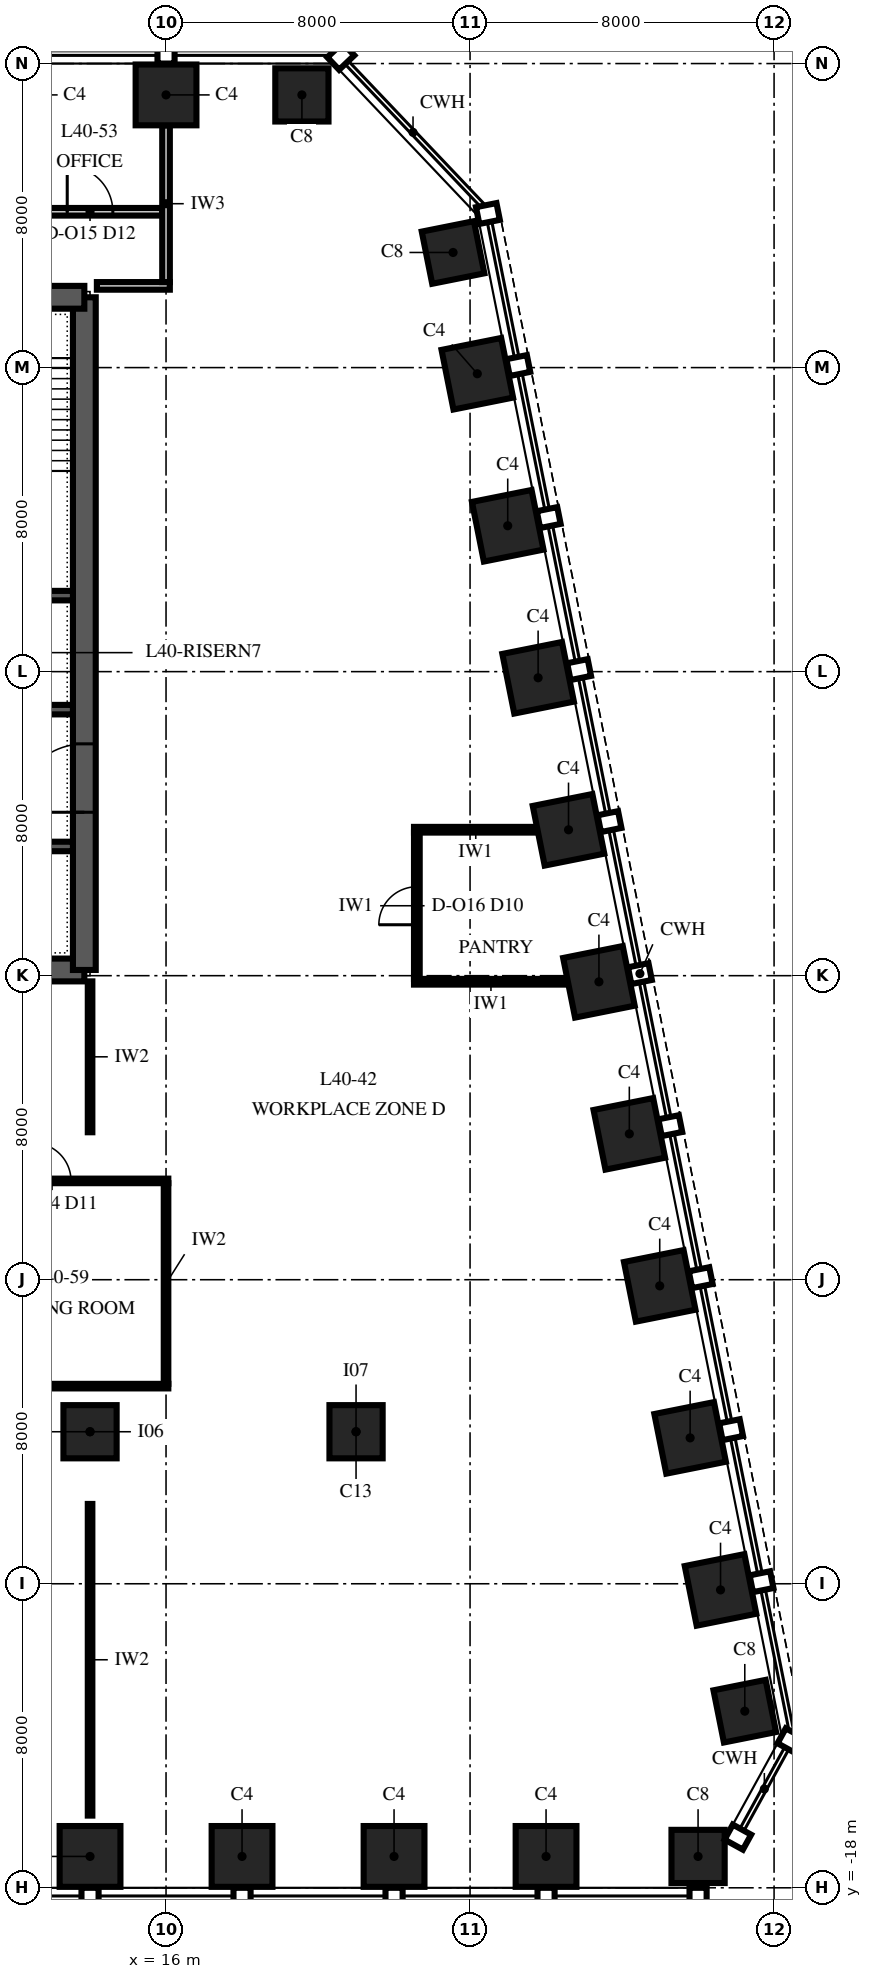
"""IFC4 building model, lengths in metres.
Left out: names, types, materials, properties, quantities, classifications, styles, units other than length and angle.
Written with IfcOpenShell. Run it as: python <this file> out.ifc"""

import sys

from ifc_helpers import new_model, si_unit, direction, frame, frame_2d, origin, origin_2d, place, context, subcontext, project, spatial, polyline, rectangle, outline, extrude, element, fill, save


model = new_model("IFC4")
c1 = context("Model", 3, precision=1e-05, world=origin(), true_north=direction((0.0, 1.0)))
c2 = subcontext(c1, "Body", "Model", "MODEL_VIEW")
j1 = project(units=[si_unit("LENGTHUNIT", "METRE"), si_unit("PLANEANGLEUNIT", "RADIAN")], contexts=[c1])
p1 = place(None, origin())
s1 = spatial("IfcSite", under=j1, at=p1, CompositionType="ELEMENT")
p2 = place(p1, origin())
s2 = spatial("IfcBuilding", under=s1, at=p2, CompositionType="ELEMENT")
p3 = place(p2, frame((0.0, 0.0, 178.0)))
s3 = spatial("IfcBuildingStorey", under=s2, at=p3, CompositionType="ELEMENT", Elevation=178.0)
for number, where, z_axis, x_axis in (
    (1, (14.0, -17.175, 0.0), (0.0, 0.0, 1.0), (1.0, 0.0, 0.0)),
    (2, (18.0, -17.175, 0.0), (0.0, 0.0, 1.0), (1.0, 0.0, 0.0)),
    (3, (22.0, -17.175, 0.0), (0.0, 0.0, 1.0), (1.0, 0.0, 0.0)),
    (4, (26.0, -17.175, 0.0), (0.0, 0.0, 1.0), (1.0, 0.0, 0.0)),
):
    element("IfcColumn", number, at=place(p3, frame(where, z_axis=z_axis, x_axis=x_axis)), inside=s3, PredefinedType="COLUMN", context=c2, shape_type="SweptSolid", body=[
        extrude(rectangle(XDim=1.6, YDim=1.6, at=origin_2d()), origin(), (0.0, 0.0, 1.0), 4.0),
    ])
for number, where, z_axis, x_axis in (
    (5, (30.0, -17.175, 0.0), (0.0, 0.0, 1.0), (1.0, 0.0, 0.0)),
    (6, (31.229, -13.353, 0.0), (0.0, 0.0, 1.0), (-0.196, 0.981, 0.0)),
):
    element("IfcColumn", number, at=place(p3, frame(where, z_axis=z_axis, x_axis=x_axis)), inside=s3, PredefinedType="COLUMN", context=c2, shape_type="SweptSolid", body=[
        extrude(rectangle(XDim=1.4, YDim=1.4, at=origin_2d()), origin(), (0.0, 0.0, 1.0), 4.0),
    ])
for number, where, z_axis, x_axis in (
    (7, (30.591, -10.162, 0.0), (0.0, 0.0, 1.0), (-0.196, 0.981, 0.0)),
    (8, (29.791, -6.162, 0.0), (0.0, 0.0, 1.0), (-0.196, 0.981, 0.0)),
    (9, (28.991, -2.162, 0.0), (0.0, 0.0, 1.0), (-0.196, 0.981, 0.0)),
    (10, (28.191, 1.838, 0.0), (0.0, 0.0, 1.0), (-0.196, 0.981, 0.0)),
    (11, (27.391, 5.838, 0.0), (0.0, 0.0, 1.0), (-0.196, 0.981, 0.0)),
    (12, (26.591, 9.838, 0.0), (0.0, 0.0, 1.0), (-0.196, 0.981, 0.0)),
    (13, (25.791, 13.838, 0.0), (0.0, 0.0, 1.0), (-0.196, 0.981, 0.0)),
    (14, (24.991, 17.838, 0.0), (0.0, 0.0, 1.0), (-0.196, 0.981, 0.0)),
    (15, (24.191, 21.838, 0.0), (0.0, 0.0, 1.0), (-0.196, 0.981, 0.0)),
):
    element("IfcColumn", number, at=place(p3, frame(where, z_axis=z_axis, x_axis=x_axis)), inside=s3, PredefinedType="COLUMN", context=c2, shape_type="SweptSolid", body=[
        extrude(rectangle(XDim=1.6, YDim=1.6, at=origin_2d()), origin(), (0.0, 0.0, 1.0), 4.0),
    ])
for number, where, z_axis, x_axis in (
    (16, (23.553, 25.029, 0.0), (0.0, 0.0, 1.0), (-0.196, 0.981, 0.0)),
    (17, (19.575, 29.175, 0.0), (0.0, 0.0, 1.0), (-1.0, 0.0, 0.0)),
):
    element("IfcColumn", number, at=place(p3, frame(where, z_axis=z_axis, x_axis=x_axis)), inside=s3, PredefinedType="COLUMN", context=c2, shape_type="SweptSolid", body=[
        extrude(rectangle(XDim=1.4, YDim=1.4, at=origin_2d()), origin(), (0.0, 0.0, 1.0), 4.0),
    ])
p4 = place(p3, frame((16.0, 29.175, 0.0), z_axis=(0.0, 0.0, 1.0), x_axis=(-1.0, 0.0, 0.0)))
e18 = element("IfcColumn", 18, at=p4, inside=s3, PredefinedType="COLUMN", context=c2, shape_type="SweptSolid", body=[
    extrude(rectangle(XDim=1.6, YDim=1.6, at=origin_2d()), origin(), (0.0, 0.0, 1.0), 4.0),
])
for number, where, z_axis, x_axis in (
    (19, (14.0, -6.0, 0.0), (0.0, 0.0, 1.0), (1.0, 0.0, 0.0)),
    (20, (21.0, -6.0, 0.0), (0.0, 0.0, 1.0), (1.0, 0.0, 0.0)),
):
    element("IfcColumn", number, at=place(p3, frame(where, z_axis=z_axis, x_axis=x_axis)), inside=s3, PredefinedType="COLUMN", context=c2, shape_type="SweptSolid", body=[
        extrude(rectangle(XDim=1.4, YDim=1.4, at=origin_2d()), origin(), (0.0, 0.0, 1.0), 4.0),
    ])
p5 = place(p3, frame((-13.85, 6.15, 0.0), z_axis=(0.0, 0.0, 1.0), x_axis=(1.0, 0.0, 0.0)))
e21 = element("IfcWall", 21, at=p5, inside=s3, PredefinedType="SHEAR", context=c2, shape_type="SweptSolid", body=[
    extrude(rectangle(XDim=27.7, YDim=0.6, at=frame_2d((13.85, 0.0))), origin(), (0.0, 0.0, 1.0), 4.0),
])
p6 = place(p3, frame((13.85, 6.15, 0.0), z_axis=(0.0, 0.0, 1.0), x_axis=(0.0, 1.0, 0.0)))
e22 = element("IfcWall", 22, at=p6, inside=s3, PredefinedType="SHEAR", context=c2, shape_type="SweptSolid", body=[
    extrude(outline(polyline([(0.0, -0.3), (17.7, -0.3), (17.7, 0.0), (17.4, 0.0), (17.4, 0.3), (0.3, 0.3), (0.3, 0.0), (0.0, 0.0), (0.0, -0.3)])), origin(), (0.0, 0.0, 1.0), 4.0),
])
p7 = place(p6, frame((4.15, 0.0, 0.0)))
e23 = element("IfcOpeningElement", 23, at=p7, cuts=e22, PredefinedType="OPENING", context=c2, shape_type="SweptSolid", body=[
    extrude(rectangle(XDim=1.8, YDim=2.4, at=frame_2d((0.9, 1.2))), frame((0.0, 0.315, 0.0), z_axis=(0.0, -1.0, 0.0), x_axis=(1.0, 0.0, 0.0)), (0.0, 0.0, 1.0), 0.63),
])
p8 = place(p3, frame((13.85, 23.85, 0.0), z_axis=(0.0, 0.0, 1.0), x_axis=(-1.0, 0.0, 0.0)))
e24 = element("IfcWall", 24, at=p8, inside=s3, PredefinedType="SHEAR", context=c2, shape_type="SweptSolid", body=[
    extrude(rectangle(XDim=27.7, YDim=0.6, at=frame_2d((13.85, 0.0))), origin(), (0.0, 0.0, 1.0), 4.0),
])
p9 = place(p8, frame((21.75, 0.0, 0.0)))
e25 = element("IfcOpeningElement", 25, at=p9, cuts=e24, PredefinedType="OPENING", context=c2, shape_type="SweptSolid", body=[
    extrude(rectangle(XDim=1.0, YDim=2.1, at=frame_2d((0.5, 1.05))), frame((0.0, 0.315, 0.0), z_axis=(0.0, -1.0, 0.0), x_axis=(1.0, 0.0, 0.0)), (0.0, 0.0, 1.0), 0.63),
])
p10 = place(p8, frame((4.95, 0.0, 0.0)))
e26 = element("IfcOpeningElement", 26, at=p10, cuts=e24, PredefinedType="OPENING", context=c2, shape_type="SweptSolid", body=[
    extrude(rectangle(XDim=1.0, YDim=2.1, at=frame_2d((0.5, 1.05))), frame((0.0, 0.315, 0.0), z_axis=(0.0, -1.0, 0.0), x_axis=(1.0, 0.0, 0.0)), (0.0, 0.0, 1.0), 0.63),
])
p11 = place(p8, frame((17.35, 0.0, 0.0)))
e27 = element("IfcOpeningElement", 27, at=p11, cuts=e24, PredefinedType="OPENING", context=c2, shape_type="SweptSolid", body=[
    extrude(rectangle(XDim=1.0, YDim=2.1, at=frame_2d((0.5, 1.05))), frame((0.0, 0.315, 0.0), z_axis=(0.0, -1.0, 0.0), x_axis=(1.0, 0.0, 0.0)), (0.0, 0.0, 1.0), 0.63),
])
p12 = place(p8, frame((13.35, 0.0, 0.0)))
e28 = element("IfcOpeningElement", 28, at=p12, cuts=e24, PredefinedType="OPENING", context=c2, shape_type="SweptSolid", body=[
    extrude(rectangle(XDim=1.0, YDim=2.1, at=frame_2d((0.5, 1.05))), frame((0.0, 0.315, 0.0), z_axis=(0.0, -1.0, 0.0), x_axis=(1.0, 0.0, 0.0)), (0.0, 0.0, 1.0), 0.63),
])
p13 = place(p8, frame((9.35, 0.0, 0.0)))
e29 = element("IfcOpeningElement", 29, at=p13, cuts=e24, PredefinedType="OPENING", context=c2, shape_type="SweptSolid", body=[
    extrude(rectangle(XDim=1.0, YDim=2.1, at=frame_2d((0.5, 1.05))), frame((0.0, 0.315, 0.0), z_axis=(0.0, -1.0, 0.0), x_axis=(1.0, 0.0, 0.0)), (0.0, 0.0, 1.0), 0.63),
])
p14 = place(p3, frame((-13.55, 9.4, 0.0), z_axis=(0.0, 0.0, 1.0), x_axis=(1.0, 0.0, 0.0)))
e30 = element("IfcWall", 30, at=p14, inside=s3, PredefinedType="SHEAR", context=c2, shape_type="SweptSolid", body=[
    extrude(rectangle(XDim=27.1, YDim=0.25, at=frame_2d((13.55, 0.0))), origin(), (0.0, 0.0, 1.0), 4.0),
])
p15 = place(p14, frame((0.4, 0.0, 0.0)))
e31 = element("IfcOpeningElement", 31, at=p15, cuts=e30, PredefinedType="OPENING", context=c2, shape_type="SweptSolid", body=[
    extrude(rectangle(XDim=1.1, YDim=2.1, at=frame_2d((0.55, 1.05))), frame((0.0, 0.14, 0.0), z_axis=(0.0, -1.0, 0.0), x_axis=(1.0, 0.0, 0.0)), (0.0, 0.0, 1.0), 0.28),
])
p16 = place(p14, frame((3.2, 0.0, 0.0)))
e32 = element("IfcOpeningElement", 32, at=p16, cuts=e30, PredefinedType="OPENING", context=c2, shape_type="SweptSolid", body=[
    extrude(rectangle(XDim=1.1, YDim=2.1, at=frame_2d((0.55, 1.05))), frame((0.0, 0.14, 0.0), z_axis=(0.0, -1.0, 0.0), x_axis=(1.0, 0.0, 0.0)), (0.0, 0.0, 1.0), 0.28),
])
p17 = place(p14, frame((6.0, 0.0, 0.0)))
e33 = element("IfcOpeningElement", 33, at=p17, cuts=e30, PredefinedType="OPENING", context=c2, shape_type="SweptSolid", body=[
    extrude(rectangle(XDim=1.1, YDim=2.1, at=frame_2d((0.55, 1.05))), frame((0.0, 0.14, 0.0), z_axis=(0.0, -1.0, 0.0), x_axis=(1.0, 0.0, 0.0)), (0.0, 0.0, 1.0), 0.28),
])
p18 = place(p3, frame((-13.55, 13.0, 0.0), z_axis=(0.0, 0.0, 1.0), x_axis=(1.0, 0.0, 0.0)))
e34 = element("IfcWall", 34, at=p18, inside=s3, PredefinedType="SHEAR", context=c2, shape_type="SweptSolid", body=[
    extrude(rectangle(XDim=27.1, YDim=0.25, at=frame_2d((13.55, 0.0))), origin(), (0.0, 0.0, 1.0), 4.0),
])
p19 = place(p18, frame((0.4, 0.0, 0.0)))
e35 = element("IfcOpeningElement", 35, at=p19, cuts=e34, PredefinedType="OPENING", context=c2, shape_type="SweptSolid", body=[
    extrude(rectangle(XDim=1.1, YDim=2.1, at=frame_2d((0.55, 1.05))), frame((0.0, 0.14, 0.0), z_axis=(0.0, -1.0, 0.0), x_axis=(1.0, 0.0, 0.0)), (0.0, 0.0, 1.0), 0.28),
])
p20 = place(p18, frame((3.2, 0.0, 0.0)))
e36 = element("IfcOpeningElement", 36, at=p20, cuts=e34, PredefinedType="OPENING", context=c2, shape_type="SweptSolid", body=[
    extrude(rectangle(XDim=1.1, YDim=2.1, at=frame_2d((0.55, 1.05))), frame((0.0, 0.14, 0.0), z_axis=(0.0, -1.0, 0.0), x_axis=(1.0, 0.0, 0.0)), (0.0, 0.0, 1.0), 0.28),
])
p21 = place(p18, frame((6.0, 0.0, 0.0)))
e37 = element("IfcOpeningElement", 37, at=p21, cuts=e34, PredefinedType="OPENING", context=c2, shape_type="SweptSolid", body=[
    extrude(rectangle(XDim=1.1, YDim=2.1, at=frame_2d((0.55, 1.05))), frame((0.0, 0.14, 0.0), z_axis=(0.0, -1.0, 0.0), x_axis=(1.0, 0.0, 0.0)), (0.0, 0.0, 1.0), 0.28),
])
p22 = place(p18, frame((15.5, 0.0, 0.0)))
e38 = element("IfcOpeningElement", 38, at=p22, cuts=e34, PredefinedType="OPENING", context=c2, shape_type="SweptSolid", body=[
    extrude(rectangle(XDim=0.9, YDim=2.1, at=frame_2d((0.45, 1.05))), frame((0.0, 0.14, 0.0), z_axis=(0.0, -1.0, 0.0), x_axis=(1.0, 0.0, 0.0)), (0.0, 0.0, 1.0), 0.28),
])
p23 = place(p18, frame((17.9, 0.0, 0.0)))
e39 = element("IfcOpeningElement", 39, at=p23, cuts=e34, PredefinedType="OPENING", context=c2, shape_type="SweptSolid", body=[
    extrude(rectangle(XDim=0.9, YDim=2.1, at=frame_2d((0.45, 1.05))), frame((0.0, 0.14, 0.0), z_axis=(0.0, -1.0, 0.0), x_axis=(1.0, 0.0, 0.0)), (0.0, 0.0, 1.0), 0.28),
])
p24 = place(p3, frame((-13.55, 16.0, 0.0), z_axis=(0.0, 0.0, 1.0), x_axis=(1.0, 0.0, 0.0)))
e40 = element("IfcWall", 40, at=p24, inside=s3, PredefinedType="SHEAR", context=c2, shape_type="SweptSolid", body=[
    extrude(rectangle(XDim=27.1, YDim=0.25, at=frame_2d((13.55, 0.0))), origin(), (0.0, 0.0, 1.0), 4.0),
])
p25 = place(p3, frame((-16.06, -4.8, 0.0), z_axis=(0.0, 0.0, 1.0), x_axis=(1.0, 0.0, 0.0)))
e41 = element("IfcWall", 41, at=p25, inside=s3, PredefinedType="PARTITIONING", context=c2, shape_type="SweptSolid", body=[
    extrude(rectangle(XDim=32.12, YDim=0.12, at=frame_2d((16.06, 0.0))), origin(), (0.0, 0.0, 1.0), 3.25),
])
p26 = place(p3, frame((3.94, 0.6, 0.0), z_axis=(0.0, 0.0, 1.0), x_axis=(1.0, 0.0, 0.0)))
e42 = element("IfcWall", 42, at=p26, inside=s3, PredefinedType="PARTITIONING", context=c2, shape_type="SweptSolid", body=[
    extrude(rectangle(XDim=12.12, YDim=0.12, at=frame_2d((6.06, 0.0))), origin(), (0.0, 0.0, 1.0), 3.25),
])
p27 = place(p26, frame((2.56, 0.0, 0.0)))
e43 = element("IfcOpeningElement", 43, at=p27, cuts=e42, PredefinedType="OPENING", context=c2, shape_type="SweptSolid", body=[
    extrude(rectangle(XDim=1.0, YDim=2.4, at=frame_2d((0.5, 1.2))), frame((0.0, 0.075, 0.0), z_axis=(0.0, -1.0, 0.0), x_axis=(1.0, 0.0, 0.0)), (0.0, 0.0, 1.0), 0.15),
])
p28 = place(p26, frame((8.56, 0.0, 0.0)))
e44 = element("IfcOpeningElement", 44, at=p28, cuts=e42, PredefinedType="OPENING", context=c2, shape_type="SweptSolid", body=[
    extrude(rectangle(XDim=1.0, YDim=2.4, at=frame_2d((0.5, 1.2))), frame((0.0, 0.075, 0.0), z_axis=(0.0, -1.0, 0.0), x_axis=(1.0, 0.0, 0.0)), (0.0, 0.0, 1.0), 0.15),
])
p29 = place(p3, frame((22.525, 5.84, 0.0), z_axis=(0.0, 0.0, 1.0), x_axis=(1.0, 0.0, 0.0)))
e45 = element("IfcWall", 45, at=p29, inside=s3, PredefinedType="PARTITIONING", context=c2, shape_type="SweptSolid", body=[
    extrude(rectangle(XDim=4.05, YDim=0.15, at=frame_2d((2.025, 0.0))), origin(), (0.0, 0.0, 1.0), 2.842),
])
p30 = place(p3, frame((22.525, 9.84, 0.0), z_axis=(0.0, 0.0, 1.0), x_axis=(1.0, 0.0, 0.0)))
e46 = element("IfcWall", 46, at=p30, inside=s3, PredefinedType="PARTITIONING", context=c2, shape_type="SweptSolid", body=[
    extrude(rectangle(XDim=3.25, YDim=0.15, at=frame_2d((1.625, 0.0))), origin(), (0.0, 0.0, 1.0), 3.25),
])
p31 = place(p3, frame((14.18, 24.15, 0.0), z_axis=(0.0, 0.0, 1.0), x_axis=(1.0, 0.0, 0.0)))
e47 = element("IfcWall", 47, at=p31, inside=s3, PredefinedType="PARTITIONING", context=c2, shape_type="SweptSolid", body=[
    extrude(rectangle(XDim=1.92, YDim=0.2, at=frame_2d((0.96, 0.0))), origin(), (0.0, 0.0, 1.0), 3.4),
])
p32 = place(p3, frame((-16.2, 26.1, 0.0), z_axis=(0.0, 0.0, 1.0), x_axis=(1.0, 0.0, 0.0)))
e48 = element("IfcWall", 48, at=p32, inside=s3, PredefinedType="PARTITIONING", context=c2, shape_type="SweptSolid", body=[
    extrude(rectangle(XDim=32.1, YDim=0.2, at=frame_2d((16.05, 0.0))), origin(), (0.0, 0.0, 1.0), 3.4),
])
p33 = place(p32, frame((1.6, 0.0, 0.0)))
e49 = element("IfcOpeningElement", 49, at=p33, cuts=e48, PredefinedType="OPENING", context=c2, shape_type="SweptSolid", body=[
    extrude(rectangle(XDim=1.2, YDim=2.4, at=frame_2d((0.6, 1.2))), frame((0.0, 0.115, 0.0), z_axis=(0.0, -1.0, 0.0), x_axis=(1.0, 0.0, 0.0)), (0.0, 0.0, 1.0), 0.23),
])
p34 = place(p32, frame((5.6, 0.0, 0.0)))
e50 = element("IfcOpeningElement", 50, at=p34, cuts=e48, PredefinedType="OPENING", context=c2, shape_type="SweptSolid", body=[
    extrude(rectangle(XDim=1.2, YDim=2.4, at=frame_2d((0.6, 1.2))), frame((0.0, 0.115, 0.0), z_axis=(0.0, -1.0, 0.0), x_axis=(1.0, 0.0, 0.0)), (0.0, 0.0, 1.0), 0.23),
])
p35 = place(p32, frame((9.6, 0.0, 0.0)))
e51 = element("IfcOpeningElement", 51, at=p35, cuts=e48, PredefinedType="OPENING", context=c2, shape_type="SweptSolid", body=[
    extrude(rectangle(XDim=1.2, YDim=2.4, at=frame_2d((0.6, 1.2))), frame((0.0, 0.115, 0.0), z_axis=(0.0, -1.0, 0.0), x_axis=(1.0, 0.0, 0.0)), (0.0, 0.0, 1.0), 0.23),
])
p36 = place(p32, frame((13.6, 0.0, 0.0)))
e52 = element("IfcOpeningElement", 52, at=p36, cuts=e48, PredefinedType="OPENING", context=c2, shape_type="SweptSolid", body=[
    extrude(rectangle(XDim=1.2, YDim=2.4, at=frame_2d((0.6, 1.2))), frame((0.0, 0.115, 0.0), z_axis=(0.0, -1.0, 0.0), x_axis=(1.0, 0.0, 0.0)), (0.0, 0.0, 1.0), 0.23),
])
p37 = place(p32, frame((17.6, 0.0, 0.0)))
e53 = element("IfcOpeningElement", 53, at=p37, cuts=e48, PredefinedType="OPENING", context=c2, shape_type="SweptSolid", body=[
    extrude(rectangle(XDim=1.2, YDim=2.4, at=frame_2d((0.6, 1.2))), frame((0.0, 0.115, 0.0), z_axis=(0.0, -1.0, 0.0), x_axis=(1.0, 0.0, 0.0)), (0.0, 0.0, 1.0), 0.23),
])
p38 = place(p32, frame((21.6, 0.0, 0.0)))
e54 = element("IfcOpeningElement", 54, at=p38, cuts=e48, PredefinedType="OPENING", context=c2, shape_type="SweptSolid", body=[
    extrude(rectangle(XDim=1.2, YDim=2.4, at=frame_2d((0.6, 1.2))), frame((0.0, 0.115, 0.0), z_axis=(0.0, -1.0, 0.0), x_axis=(1.0, 0.0, 0.0)), (0.0, 0.0, 1.0), 0.23),
])
p39 = place(p32, frame((25.6, 0.0, 0.0)))
e55 = element("IfcOpeningElement", 55, at=p39, cuts=e48, PredefinedType="OPENING", context=c2, shape_type="SweptSolid", body=[
    extrude(rectangle(XDim=1.2, YDim=2.4, at=frame_2d((0.6, 1.2))), frame((0.0, 0.115, 0.0), z_axis=(0.0, -1.0, 0.0), x_axis=(1.0, 0.0, 0.0)), (0.0, 0.0, 1.0), 0.23),
])
p40 = place(p32, frame((29.6, 0.0, 0.0)))
e56 = element("IfcOpeningElement", 56, at=p40, cuts=e48, PredefinedType="OPENING", context=c2, shape_type="SweptSolid", body=[
    extrude(rectangle(XDim=1.2, YDim=2.4, at=frame_2d((0.6, 1.2))), frame((0.0, 0.115, 0.0), z_axis=(0.0, -1.0, 0.0), x_axis=(1.0, 0.0, 0.0)), (0.0, 0.0, 1.0), 0.23),
])
p41 = place(p3, frame((16.0, -4.74, 0.0), z_axis=(0.0, 0.0, 1.0), x_axis=(0.0, 1.0, 0.0)))
e57 = element("IfcWall", 57, at=p41, inside=s3, PredefinedType="PARTITIONING", context=c2, shape_type="SweptSolid", body=[
    extrude(rectangle(XDim=5.28, YDim=0.12, at=frame_2d((2.64, 0.0))), origin(), (0.0, 0.0, 1.0), 3.85),
])
p42 = place(p3, frame((16.0, 24.25, 0.0), z_axis=(0.0, 0.0, 1.0), x_axis=(0.0, 1.0, 0.0)))
e58 = element("IfcWall", 58, at=p42, inside=s3, PredefinedType="PARTITIONING", context=c2, shape_type="SweptSolid", body=[
    extrude(rectangle(XDim=4.125, YDim=0.2, at=frame_2d((2.062, 0.0))), origin(), (0.0, 0.0, 1.0), 3.4),
])
p43 = place(p3, frame((22.6, 5.915, 0.0), z_axis=(0.0, 0.0, 1.0), x_axis=(0.0, 1.0, 0.0)))
e59 = element("IfcWall", 59, at=p43, inside=s3, PredefinedType="PARTITIONING", context=c2, shape_type="SweptSolid", body=[
    extrude(rectangle(XDim=3.85, YDim=0.15, at=frame_2d((1.925, 0.0))), origin(), (0.0, 0.0, 1.0), 2.842),
])
p44 = place(p43, frame((1.425, 0.0, 0.0)))
e60 = element("IfcOpeningElement", 60, at=p44, cuts=e59, PredefinedType="OPENING", context=c2, shape_type="SweptSolid", body=[
    extrude(rectangle(XDim=1.0, YDim=2.3, at=frame_2d((0.5, 1.15))), frame((0.0, 0.09, 0.0), z_axis=(0.0, -1.0, 0.0), x_axis=(1.0, 0.0, 0.0)), (0.0, 0.0, 1.0), 0.18),
])
p45 = place(p3, frame((14.001, -16.1, 0.0), z_axis=(0.0, 0.0, 1.0), x_axis=(0.0, 1.0, 0.0)))
e61 = element("IfcWall", 61, at=p45, inside=s3, PredefinedType="PARTITIONING", context=c2, shape_type="SweptSolid", body=[
    extrude(rectangle(XDim=8.2, YDim=0.12, at=frame_2d((4.1, 0.0))), origin(), (0.0, 0.0, 1.0), 3.25),
])
p46 = place(p3, frame((14.001, 1.88, 0.0), z_axis=(0.0, 0.0, 1.0), x_axis=(0.0, 1.0, 0.0)))
e62 = element("IfcWall", 62, at=p46, inside=s3, PredefinedType="PARTITIONING", context=c2, shape_type="SweptSolid", body=[
    extrude(rectangle(XDim=3.97, YDim=0.12, at=frame_2d((1.985, 0.0))), origin(), (0.0, 0.0, 1.0), 3.25),
])
p47 = place(p7, origin())
e63 = element("IfcDoor", 63, at=p47, inside=s3, OperationType="DOUBLE_DOOR_SINGLE_SWING", PredefinedType="DOOR", context=c2, shape_type="SweptSolid", body=[
    extrude(rectangle(XDim=1.8, YDim=2.4, at=frame_2d((0.9, 1.2))), frame((0.0, 0.3, 0.0), z_axis=(0.0, -1.0, 0.0), x_axis=(1.0, 0.0, 0.0)), (0.0, 0.0, 1.0), 0.6),
])
fill(e23, e63)
p48 = place(p28, origin())
e64 = element("IfcDoor", 64, at=p48, inside=s3, OperationType="SINGLE_SWING_RIGHT", PredefinedType="DOOR", context=c2, shape_type="SweptSolid", body=[
    extrude(rectangle(XDim=1.0, YDim=2.4, at=frame_2d((0.5, 1.2))), frame((0.0, 0.06, 0.0), z_axis=(0.0, -1.0, 0.0), x_axis=(1.0, 0.0, 0.0)), (0.0, 0.0, 1.0), 0.12),
])
fill(e44, e64)
p49 = place(p40, origin())
e65 = element("IfcDoor", 65, at=p49, inside=s3, OperationType="SINGLE_SWING_LEFT", PredefinedType="DOOR", context=c2, shape_type="SweptSolid", body=[
    extrude(rectangle(XDim=1.2, YDim=2.4, at=frame_2d((0.6, 1.2))), frame((0.0, 0.1, 0.0), z_axis=(0.0, -1.0, 0.0), x_axis=(1.0, 0.0, 0.0)), (0.0, 0.0, 1.0), 0.199),
])
fill(e56, e65)
p50 = place(p44, origin())
e66 = element("IfcDoor", 66, at=p50, inside=s3, OperationType="SINGLE_SWING_LEFT", PredefinedType="DOOR", context=c2, shape_type="SweptSolid", body=[
    extrude(rectangle(XDim=1.0, YDim=2.3, at=frame_2d((0.5, 1.15))), frame((0.0, 0.075, 0.0), z_axis=(0.0, -1.0, 0.0), x_axis=(1.0, 0.0, 0.0)), (0.0, 0.0, 1.0), 0.149),
])
fill(e60, e66)
save(model, sys.argv[1])
